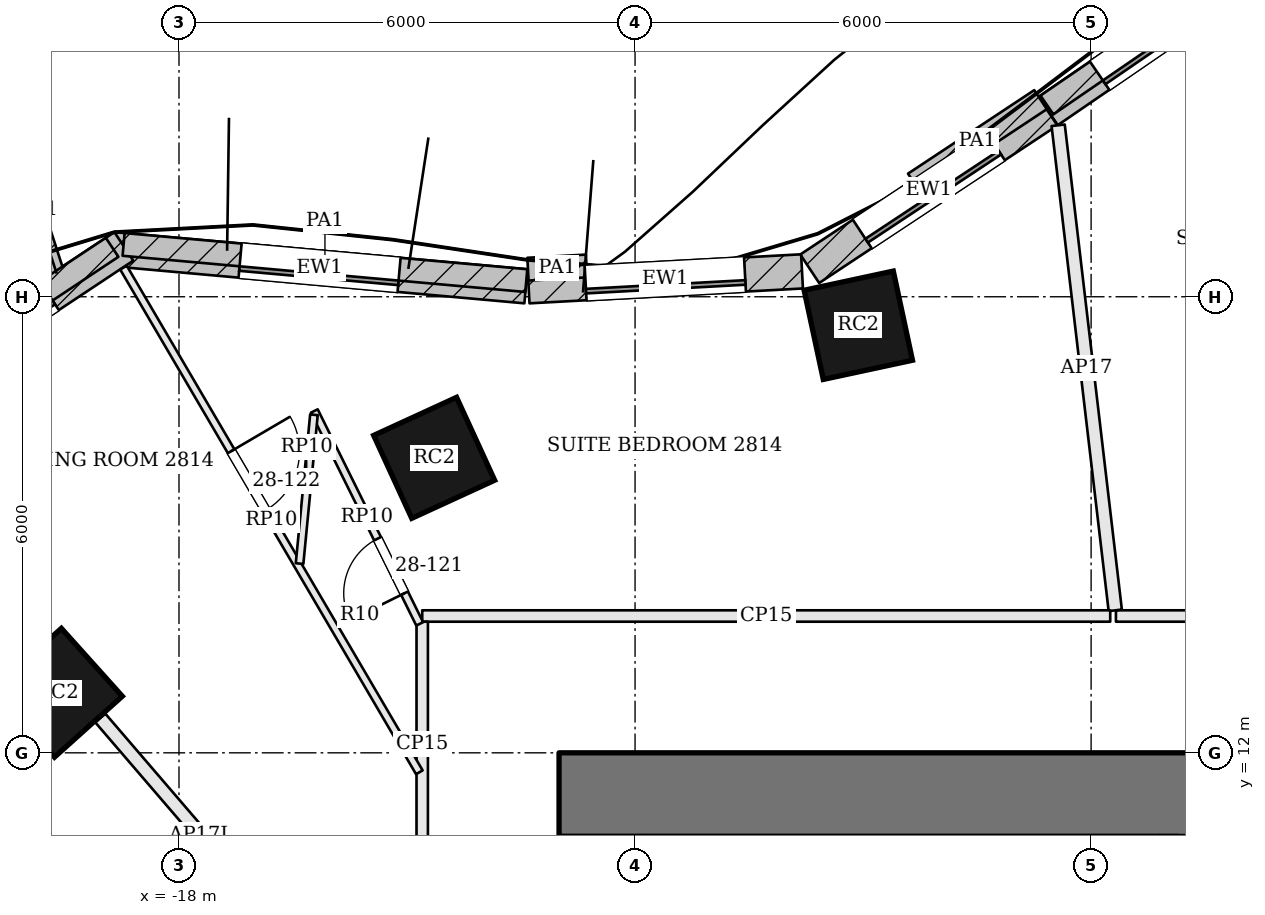
"""IFC4 building model, lengths in metres.
Left out: names, types, materials, properties, quantities, classifications, styles, units other than length and angle.
Written with IfcOpenShell. Run it as: python <this file> out.ifc"""

import sys

from ifc_helpers import new_model, si_unit, direction, frame, frame_2d, origin, origin_2d, place, context, subcontext, project, spatial, rectangle, extrude, element, fill, save


model = new_model("IFC4")
c1 = context("Model", 3, precision=1e-05, world=origin(), true_north=direction((0.0, 1.0)))
c2 = subcontext(c1, "Body", "Model", "MODEL_VIEW")
j1 = project(units=[si_unit("LENGTHUNIT", "METRE"), si_unit("PLANEANGLEUNIT", "RADIAN")], contexts=[c1])
p1 = place(None, origin())
s1 = spatial("IfcSite", under=j1, at=p1, CompositionType="ELEMENT")
p2 = place(p1, origin())
s2 = spatial("IfcBuilding", under=s1, at=p2, CompositionType="ELEMENT")
p3 = place(p2, frame((0.0, 0.0, 117.6)))
s3 = spatial("IfcBuildingStorey", under=s2, at=p3, CompositionType="ELEMENT", Elevation=117.6)
p4 = place(p3, frame((-13.0, 11.45, 0.0), z_axis=(0.0, 0.0, 1.0), x_axis=(1.0, 0.0, 0.0)))
e1 = element("IfcWall", 1, at=p4, inside=s3, PredefinedType="SHEAR", context=c2, shape_type="SweptSolid", body=[
    extrude(rectangle(XDim=26.0, YDim=1.1, at=frame_2d((13.0, 0.0))), origin(), (0.0, 0.0, 1.0), 3.6),
])
p5 = place(p4, frame((8.825, 0.0, 0.0)))
e2 = element("IfcOpeningElement", 2, at=p5, cuts=e1, PredefinedType="OPENING", context=c2, shape_type="SweptSolid", body=[
    extrude(rectangle(XDim=1.0, YDim=2.1, at=frame_2d((0.5, 1.05))), frame((0.0, 0.56, 0.0), z_axis=(0.0, -1.0, 0.0), x_axis=(1.0, 0.0, 0.0)), (0.0, 0.0, 1.0), 1.12),
])
p6 = place(p4, frame((11.275, 0.0, 0.0)))
e3 = element("IfcOpeningElement", 3, at=p6, cuts=e1, PredefinedType="OPENING", context=c2, shape_type="SweptSolid", body=[
    extrude(rectangle(XDim=1.0, YDim=2.1, at=frame_2d((0.5, 1.05))), frame((0.0, 0.56, 0.0), z_axis=(0.0, -1.0, 0.0), x_axis=(1.0, 0.0, 0.0)), (0.0, 0.0, 1.0), 1.12),
])
p7 = place(p4, frame((14.125, 0.0, 0.0)))
e4 = element("IfcOpeningElement", 4, at=p7, cuts=e1, PredefinedType="OPENING", context=c2, shape_type="SweptSolid", body=[
    extrude(rectangle(XDim=1.0, YDim=2.1, at=frame_2d((0.5, 1.05))), frame((0.0, 0.56, 0.0), z_axis=(0.0, -1.0, 0.0), x_axis=(1.0, 0.0, 0.0)), (0.0, 0.0, 1.0), 1.12),
])
p8 = place(p4, frame((16.725, 0.0, 0.0)))
e5 = element("IfcOpeningElement", 5, at=p8, cuts=e1, PredefinedType="OPENING", context=c2, shape_type="SweptSolid", body=[
    extrude(rectangle(XDim=0.7, YDim=2.1, at=frame_2d((0.35, 1.05))), frame((0.0, 0.56, 0.0), z_axis=(0.0, -1.0, 0.0), x_axis=(1.0, 0.0, 0.0)), (0.0, 0.0, 1.0), 1.12),
])
for number, where, z_axis, x_axis in (
    (6, (-9.063, 17.625, 0.0), (0.0, 0.0, 1.0), (-0.978, -0.21, 0.0)),
    (7, (-14.643, 15.881, 0.0), (0.0, 0.0, 1.0), (-0.909, -0.417, 0.0)),
    (8, (-19.593, 12.79, 0.0), (0.0, 0.0, 1.0), (-0.744, -0.668, 0.0)),
):
    element("IfcColumn", number, at=place(p3, frame(where, z_axis=z_axis, x_axis=x_axis)), inside=s3, PredefinedType="COLUMN", context=c2, shape_type="SweptSolid", body=[
        extrude(rectangle(XDim=1.2, YDim=1.2, at=origin_2d()), origin(), (0.0, 0.0, 1.0), 2.8),
    ])
p9 = place(p3, frame((-3.479, 22.56, 0.0), z_axis=(0.0, 0.0, 1.0), x_axis=(-0.824722766417, -0.565537230033, 0.0)))
e9 = element("IfcWall", 9, at=p9, inside=s3, PredefinedType="SOLIDWALL", context=c2, shape_type="SweptSolid", body=[
    extrude(rectangle(XDim=3.742, YDim=0.45, at=frame_2d((1.871, 0.0))), origin(), (0.0, 0.0, 1.0), 3.3),
])
p10 = place(p9, frame((0.821, 0.0, 0.9)))
e10 = element("IfcOpeningElement", 10, at=p10, cuts=e9, PredefinedType="OPENING", context=c2, shape_type="SweptSolid", body=[
    extrude(rectangle(XDim=2.1, YDim=1.8, at=frame_2d((1.05, 0.9))), frame((0.0, 0.235, 0.0), z_axis=(0.0, -1.0, 0.0), x_axis=(1.0, 0.0, 0.0)), (0.0, 0.0, 1.0), 0.47),
])
p11 = place(p3, frame((-6.568, 20.441, 0.0), z_axis=(0.0, 0.0, 1.0), x_axis=(-0.834034214531, -0.551712723246, 0.0)))
e11 = element("IfcWall", 11, at=p11, inside=s3, PredefinedType="SOLIDWALL", context=c2, shape_type="SweptSolid", body=[
    extrude(rectangle(XDim=3.757, YDim=0.45, at=frame_2d((1.879, 0.0))), origin(), (0.0, 0.0, 1.0), 3.3),
])
p12 = place(p11, frame((0.829, 0.0, 0.9)))
e12 = element("IfcOpeningElement", 12, at=p12, cuts=e11, PredefinedType="OPENING", context=c2, shape_type="SweptSolid", body=[
    extrude(rectangle(XDim=2.1, YDim=1.8, at=frame_2d((1.05, 0.9))), frame((0.0, 0.235, 0.0), z_axis=(0.0, -1.0, 0.0), x_axis=(1.0, 0.0, 0.0)), (0.0, 0.0, 1.0), 0.47),
])
p13 = place(p3, frame((-9.803, 18.334, 0.0), z_axis=(0.0, 0.0, 1.0), x_axis=(-0.998525941495, -0.054276552602, 0.0)))
e13 = element("IfcWall", 13, at=p13, inside=s3, PredefinedType="SOLIDWALL", context=c2, shape_type="SweptSolid", body=[
    extrude(rectangle(XDim=3.603, YDim=0.45, at=frame_2d((1.802, 0.0))), origin(), (0.0, 0.0, 1.0), 3.3),
])
p14 = place(p13, frame((0.751, 0.0, 0.9)))
e14 = element("IfcOpeningElement", 14, at=p14, cuts=e13, PredefinedType="OPENING", context=c2, shape_type="SweptSolid", body=[
    extrude(rectangle(XDim=2.1, YDim=1.8, at=frame_2d((1.05, 0.9))), frame((0.0, 0.235, 0.0), z_axis=(0.0, -1.0, 0.0), x_axis=(1.0, 0.0, 0.0)), (0.0, 0.0, 1.0), 0.47),
])
p15 = place(p3, frame((-13.436, 18.138, 0.0), z_axis=(0.0, 0.0, 1.0), x_axis=(-0.99598810213, 0.089485755376, 0.0)))
e15 = element("IfcWall", 15, at=p15, inside=s3, PredefinedType="SOLIDWALL", context=c2, shape_type="SweptSolid", body=[
    extrude(rectangle(XDim=5.451, YDim=0.45, at=frame_2d((2.726, 0.0))), origin(), (0.0, 0.0, 1.0), 3.3),
])
p16 = place(p15, frame((1.676, 0.0, 0.9)))
e16 = element("IfcOpeningElement", 16, at=p16, cuts=e15, PredefinedType="OPENING", context=c2, shape_type="SweptSolid", body=[
    extrude(rectangle(XDim=2.1, YDim=1.8, at=frame_2d((1.05, 0.9))), frame((0.0, 0.235, 0.0), z_axis=(0.0, -1.0, 0.0), x_axis=(1.0, 0.0, 0.0)), (0.0, 0.0, 1.0), 0.47),
])
p17 = place(p3, frame((-18.726, 18.663, 0.0), z_axis=(0.0, 0.0, 1.0), x_axis=(-0.83333921474, -0.552761931736, 0.0)))
e17 = element("IfcWall", 17, at=p17, inside=s3, PredefinedType="SOLIDWALL", context=c2, shape_type="SweptSolid", body=[
    extrude(rectangle(XDim=4.451, YDim=0.45, at=frame_2d((2.225, 0.0))), origin(), (0.0, 0.0, 1.0), 3.3),
])
p18 = place(p17, frame((1.175, 0.0, 0.9)))
e18 = element("IfcOpeningElement", 18, at=p18, cuts=e17, PredefinedType="OPENING", context=c2, shape_type="SweptSolid", body=[
    extrude(rectangle(XDim=2.1, YDim=1.8, at=frame_2d((1.05, 0.9))), frame((0.0, 0.235, 0.0), z_axis=(0.0, -1.0, 0.0), x_axis=(1.0, 0.0, 0.0)), (0.0, 0.0, 1.0), 0.47),
])
p19 = place(p3, frame((-19.609, 18.305, 0.0), z_axis=(0.0, 0.0, 1.0), x_axis=(-0.308600224758, 0.951191832008, 0.0)))
e19 = element("IfcWall", 19, at=p19, inside=s3, PredefinedType="SOLIDWALL", context=c2, shape_type="SweptSolid", body=[
    extrude(rectangle(XDim=1.75, YDim=0.2, at=frame_2d((0.875, 0.0))), origin(), (0.0, 0.0, 1.0), 3.3),
])
p20 = place(p3, frame((-3.599, 22.568, 3.6), z_axis=(0.0, 0.0, 1.0), x_axis=(-0.82476034254, -0.565482428881, 0.0)))
e20 = element("IfcWall", 20, at=p20, inside=s3, PredefinedType="PARAPET", context=c2, shape_type="SweptSolid", body=[
    extrude(rectangle(XDim=3.616, YDim=0.3, at=frame_2d((1.808, 0.0))), origin(), (0.0, 0.0, 1.0), 1.1),
])
p21 = place(p3, frame((-6.665, 20.593, 3.6), z_axis=(0.0, 0.0, 1.0), x_axis=(-0.834081514068, -0.551641213008, 0.0)))
e21 = element("IfcWall", 21, at=p21, inside=s3, PredefinedType="PARAPET", context=c2, shape_type="SweptSolid", body=[
    extrude(rectangle(XDim=1.991, YDim=0.3, at=frame_2d((0.996, 0.0))), origin(), (0.0, 0.0, 1.0), 1.1),
])
p22 = place(p3, frame((-12.639, 18.405, 3.6), z_axis=(0.0, 0.0, 1.0), x_axis=(-0.998517272222, -0.054435806917, 0.0)))
e22 = element("IfcWall", 22, at=p22, inside=s3, PredefinedType="PARAPET", context=c2, shape_type="SweptSolid", body=[
    extrude(rectangle(XDim=0.771, YDim=0.3, at=frame_2d((0.386, 0.0))), origin(), (0.0, 0.0, 1.0), 1.1),
])
p23 = place(p3, frame((-13.431, 18.212, 3.6), z_axis=(0.0, 0.0, 1.0), x_axis=(-0.995986354678, 0.089505202619, 0.0)))
e23 = element("IfcWall", 23, at=p23, inside=s3, PredefinedType="PARAPET", context=c2, shape_type="SweptSolid", body=[
    extrude(rectangle(XDim=5.319, YDim=0.3, at=frame_2d((2.659, 0.0))), origin(), (0.0, 0.0, 1.0), 1.1),
])
p24 = place(p3, frame((-18.88, 18.65, 3.6), z_axis=(0.0, 0.0, 1.0), x_axis=(-0.833379877726, -0.552700623667, 0.0)))
e24 = element("IfcWall", 24, at=p24, inside=s3, PredefinedType="PARAPET", context=c2, shape_type="SweptSolid", body=[
    extrude(rectangle(XDim=4.173, YDim=0.3, at=frame_2d((2.087, 0.0))), origin(), (0.0, 0.0, 1.0), 1.1),
])
p25 = place(p3, frame((2.76, 13.8, 0.0), z_axis=(0.0, 0.0, 1.0), x_axis=(-1.0, 0.0, 0.0)))
e25 = element("IfcWall", 25, at=p25, inside=s3, PredefinedType="PARTITIONING", context=c2, shape_type="SweptSolid", body=[
    extrude(rectangle(XDim=8.434, YDim=0.15, at=frame_2d((4.217, 0.0))), origin(), (0.0, 0.0, 1.0), 2.684),
])
p26 = place(p25, frame((5.126, 0.0, 0.0)))
e26 = element("IfcOpeningElement", 26, at=p26, cuts=e25, PredefinedType="OPENING", context=c2, shape_type="SweptSolid", body=[
    extrude(rectangle(XDim=1.0, YDim=2.1, at=frame_2d((0.5, 1.05))), frame((0.0, 0.085, 0.0), z_axis=(0.0, -1.0, 0.0), x_axis=(1.0, 0.0, 0.0)), (0.0, 0.0, 1.0), 0.17),
])
p27 = place(p3, frame((-6.433, 20.256, 0.0), z_axis=(0.0, 0.0, 1.0), x_axis=(0.116872110209, -0.993146972938, 0.0)))
e27 = element("IfcWall", 27, at=p27, inside=s3, PredefinedType="PARTITIONING", context=c2, shape_type="SweptSolid", body=[
    extrude(rectangle(XDim=6.426, YDim=0.175, at=frame_2d((3.213, 0.0))), origin(), (0.0, 0.0, 1.0), 2.684),
])
p28 = place(p3, frame((-5.749, 13.8, 0.0), z_axis=(0.0, 0.0, 1.0), x_axis=(-1.0, 0.0, 0.0)))
e28 = element("IfcWall", 28, at=p28, inside=s3, PredefinedType="PARTITIONING", context=c2, shape_type="SweptSolid", body=[
    extrude(rectangle(XDim=9.052, YDim=0.15, at=frame_2d((4.526, 0.0))), origin(), (0.0, 0.0, 1.0), 2.684),
])
p29 = place(p3, frame((-14.8, 13.725, 0.0), z_axis=(0.0, 0.0, 1.0), x_axis=(0.0, -1.0, 0.0)))
e29 = element("IfcWall", 29, at=p29, inside=s3, PredefinedType="PARTITIONING", context=c2, shape_type="SweptSolid", body=[
    extrude(rectangle(XDim=3.228, YDim=0.15, at=frame_2d((1.614, 0.0))), origin(), (0.0, 0.0, 1.0), 2.684),
])
p30 = place(p3, frame((-19.035, 12.458, 0.0), z_axis=(0.0, 0.0, 1.0), x_axis=(0.651615806177, -0.758549168571, 0.0)))
e30 = element("IfcWall", 30, at=p30, inside=s3, PredefinedType="PARTITIONING", context=c2, shape_type="SweptSolid", body=[
    extrude(rectangle(XDim=4.071, YDim=0.175, at=frame_2d((2.035, 0.0))), origin(), (0.0, 0.0, 1.0), 2.28),
])
p31 = place(p3, frame((-18.73, 18.384, 0.0), z_axis=(0.0, 0.0, 1.0), x_axis=(0.505731710935, -0.862690811679, 0.0)))
e31 = element("IfcWall", 31, at=p31, inside=s3, PredefinedType="PARTITIONING", context=c2, shape_type="SweptSolid", body=[
    extrude(rectangle(XDim=7.697, YDim=0.1, at=frame_2d((3.848, 0.0))), origin(), (0.0, 0.0, 1.0), 2.684),
])
p32 = place(p31, frame((2.8, 0.0, 0.0)))
e32 = element("IfcOpeningElement", 32, at=p32, cuts=e31, PredefinedType="OPENING", context=c2, shape_type="SweptSolid", body=[
    extrude(rectangle(XDim=0.9, YDim=2.4, at=frame_2d((0.45, 1.2))), frame((0.0, 0.06, 0.0), z_axis=(0.0, -1.0, 0.0), x_axis=(1.0, 0.0, 0.0)), (0.0, 0.0, 1.0), 0.12),
])
p33 = place(p3, frame((-14.833, 13.697, 0.0), z_axis=(0.0, 0.0, 1.0), x_axis=(-0.443678804827, 0.896185872544, 0.0)))
e33 = element("IfcWall", 33, at=p33, inside=s3, PredefinedType="PARTITIONING", context=c2, shape_type="SweptSolid", body=[
    extrude(rectangle(XDim=3.125, YDim=0.1, at=frame_2d((1.562, 0.0))), origin(), (0.0, 0.0, 1.0), 2.684),
])
p34 = place(p33, frame((0.45, 0.0, 0.0)))
e34 = element("IfcOpeningElement", 34, at=p34, cuts=e33, PredefinedType="OPENING", context=c2, shape_type="SweptSolid", body=[
    extrude(rectangle(XDim=0.8, YDim=2.1, at=frame_2d((0.4, 1.05))), frame((0.0, 0.06, 0.0), z_axis=(0.0, -1.0, 0.0), x_axis=(1.0, 0.0, 0.0)), (0.0, 0.0, 1.0), 0.12),
])
p35 = place(p3, frame((-16.225, 16.447, 0.0), z_axis=(0.0, 0.0, 1.0), x_axis=(-0.096086146031, -0.995373021807, 0.0)))
e35 = element("IfcWall", 35, at=p35, inside=s3, PredefinedType="PARTITIONING", context=c2, shape_type="SweptSolid", body=[
    extrude(rectangle(XDim=1.967, YDim=0.1, at=frame_2d((0.983, 0.0))), origin(), (0.0, 0.0, 1.0), 2.684),
])
p36 = place(p3, frame((-23.302, 12.023, 0.0), z_axis=(0.0, 0.0, 1.0), x_axis=(0.779059160474, -0.626950416286, 0.0)))
e36 = element("IfcWall", 36, at=p36, inside=s3, PredefinedType="PARTITIONING", context=c2, shape_type="SweptSolid", body=[
    extrude(rectangle(XDim=6.923, YDim=0.1, at=frame_2d((3.461, 0.0))), origin(), (0.0, 0.0, 1.0), 2.684),
])
p37 = place(p36, frame((2.847, 0.0, 0.0)))
e37 = element("IfcOpeningElement", 37, at=p37, cuts=e36, PredefinedType="OPENING", context=c2, shape_type="SweptSolid", body=[
    extrude(rectangle(XDim=0.9, YDim=2.4, at=frame_2d((0.45, 1.2))), frame((0.0, 0.06, 0.0), z_axis=(0.0, -1.0, 0.0), x_axis=(1.0, 0.0, 0.0)), (0.0, 0.0, 1.0), 0.12),
])
p38 = place(p10, origin())
e38 = element("IfcWindow", 38, at=p38, inside=s3, PartitioningType="SINGLE_PANEL", PredefinedType="WINDOW", context=c2, shape_type="SweptSolid", body=[
    extrude(rectangle(XDim=2.1, YDim=1.8, at=frame_2d((1.05, 0.9))), frame((0.0, 0.135, 0.0), z_axis=(0.0, -1.0, 0.0), x_axis=(1.0, 0.0, 0.0)), (0.0, 0.0, 1.0), 0.06),
])
fill(e10, e38)
p39 = place(p12, origin())
e39 = element("IfcWindow", 39, at=p39, inside=s3, PartitioningType="SINGLE_PANEL", PredefinedType="WINDOW", context=c2, shape_type="SweptSolid", body=[
    extrude(rectangle(XDim=2.1, YDim=1.8, at=frame_2d((1.05, 0.9))), frame((0.0, 0.135, 0.0), z_axis=(0.0, -1.0, 0.0), x_axis=(1.0, 0.0, 0.0)), (0.0, 0.0, 1.0), 0.06),
])
fill(e12, e39)
p40 = place(p14, origin())
e40 = element("IfcWindow", 40, at=p40, inside=s3, PartitioningType="SINGLE_PANEL", PredefinedType="WINDOW", context=c2, shape_type="SweptSolid", body=[
    extrude(rectangle(XDim=2.1, YDim=1.8, at=frame_2d((1.05, 0.9))), frame((0.0, 0.135, 0.0), z_axis=(0.0, -1.0, 0.0), x_axis=(1.0, 0.0, 0.0)), (0.0, 0.0, 1.0), 0.06),
])
fill(e14, e40)
p41 = place(p16, origin())
e41 = element("IfcWindow", 41, at=p41, inside=s3, PartitioningType="SINGLE_PANEL", PredefinedType="WINDOW", context=c2, shape_type="SweptSolid", body=[
    extrude(rectangle(XDim=2.1, YDim=1.8, at=frame_2d((1.05, 0.9))), frame((0.0, 0.135, 0.0), z_axis=(0.0, -1.0, 0.0), x_axis=(1.0, 0.0, 0.0)), (0.0, 0.0, 1.0), 0.06),
])
fill(e16, e41)
p42 = place(p18, origin())
e42 = element("IfcWindow", 42, at=p42, inside=s3, PartitioningType="SINGLE_PANEL", PredefinedType="WINDOW", context=c2, shape_type="SweptSolid", body=[
    extrude(rectangle(XDim=2.1, YDim=1.8, at=frame_2d((1.05, 0.9))), frame((0.0, 0.135, 0.0), z_axis=(0.0, -1.0, 0.0), x_axis=(1.0, 0.0, 0.0)), (0.0, 0.0, 1.0), 0.06),
])
fill(e18, e42)
p43 = place(p34, origin())
e43 = element("IfcDoor", 43, at=p43, inside=s3, OperationType="SINGLE_SWING_LEFT", PredefinedType="DOOR", context=c2, shape_type="SweptSolid", body=[
    extrude(rectangle(XDim=0.8, YDim=2.1, at=frame_2d((0.4, 1.05))), frame((0.0, 0.025, 0.0), z_axis=(0.0, -1.0, 0.0), x_axis=(1.0, 0.0, 0.0)), (0.0, 0.0, 1.0), 0.05),
])
fill(e34, e43)
p44 = place(p32, origin())
e44 = element("IfcDoor", 44, at=p44, inside=s3, OperationType="SINGLE_SWING_LEFT", PredefinedType="DOOR", context=c2, shape_type="SweptSolid", body=[
    extrude(rectangle(XDim=0.9, YDim=2.4, at=frame_2d((0.45, 1.2))), frame((0.0, 0.025, 0.0), z_axis=(0.0, -1.0, 0.0), x_axis=(1.0, 0.0, 0.0)), (0.0, 0.0, 1.0), 0.05),
])
fill(e32, e44)
save(model, sys.argv[1])
